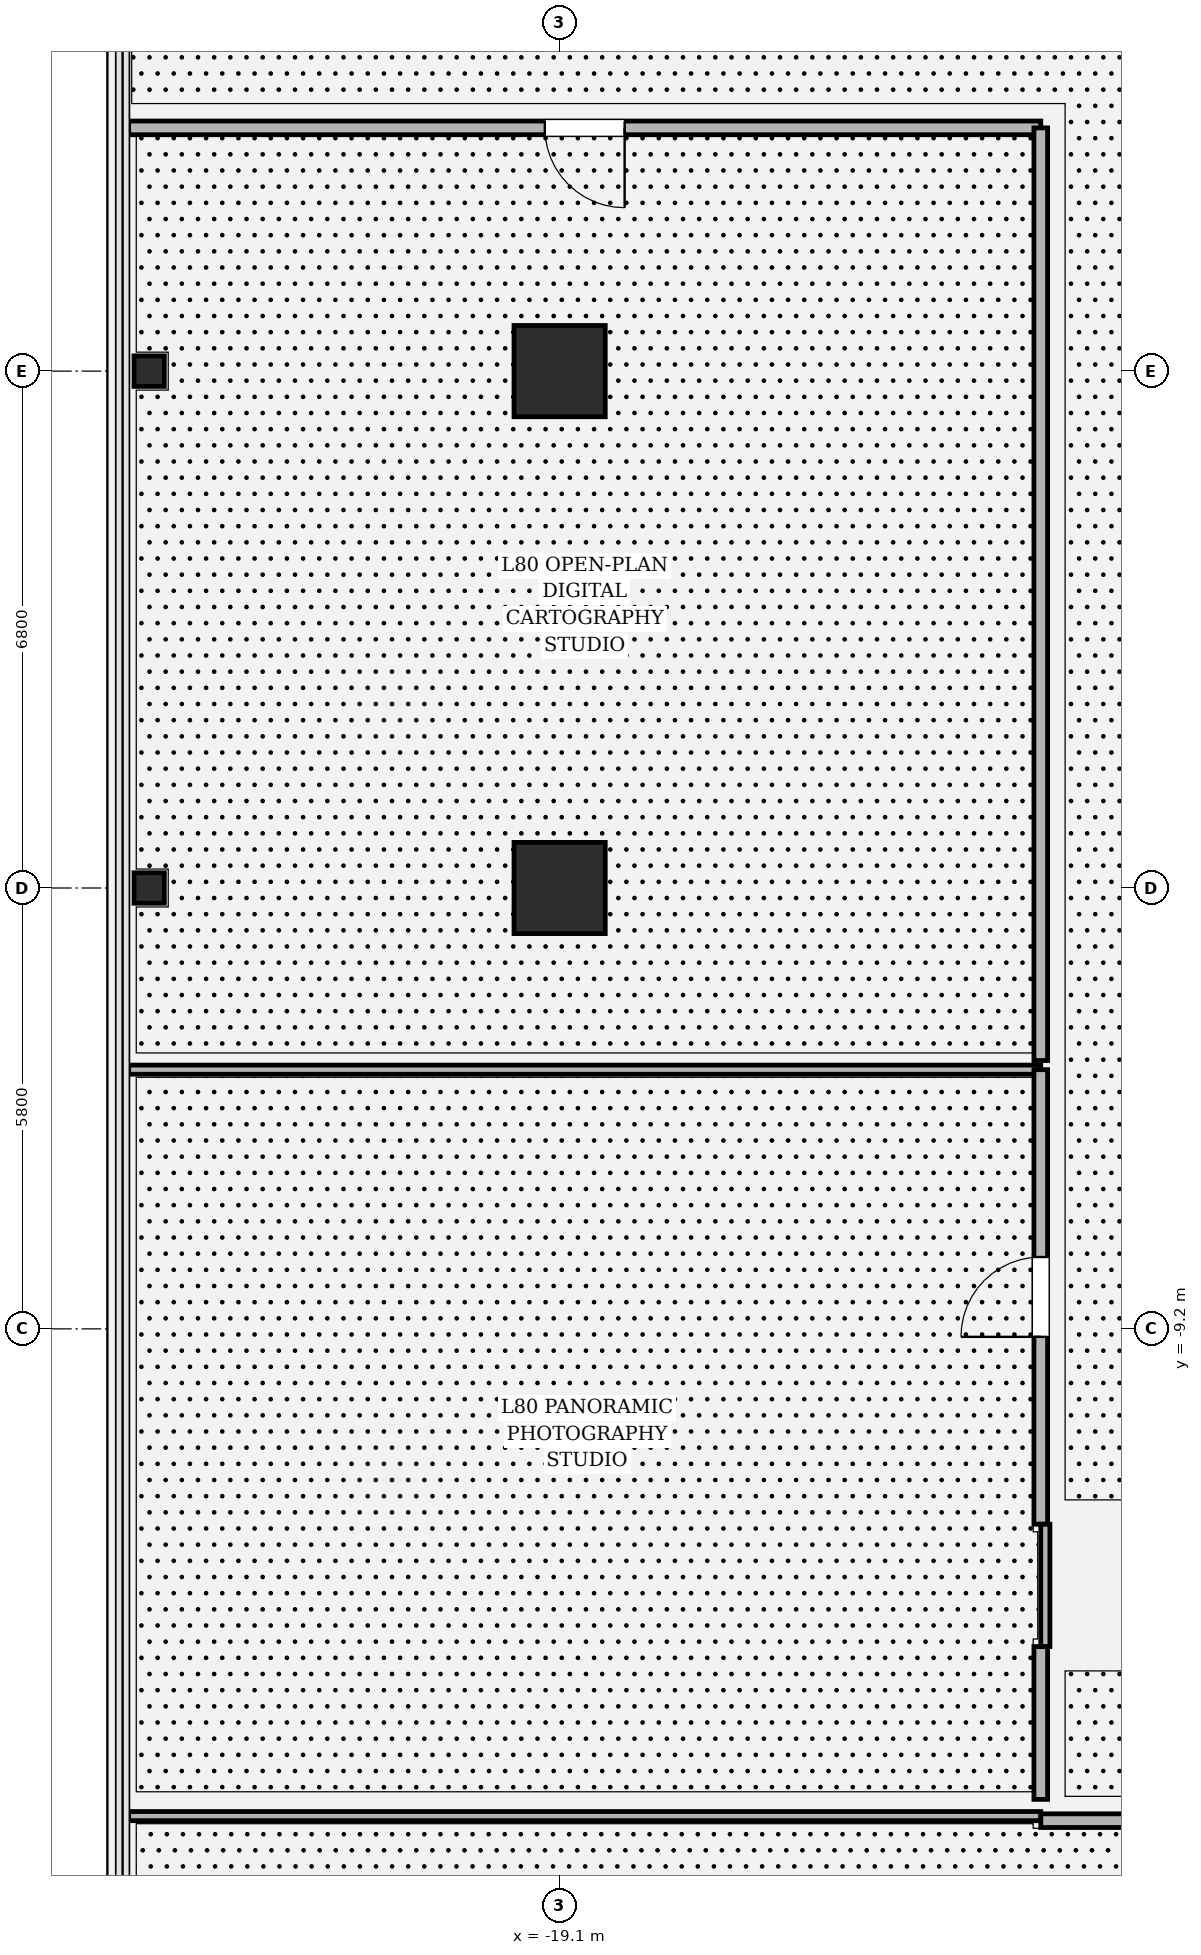
"""IFC4 building model, lengths in metres.
Left out: names, types, materials, properties, quantities, classifications, styles, units other than length and angle.
Written with IfcOpenShell. Run it as: python <this file> out.ifc"""

import sys

from ifc_helpers import new_model, si_unit, direction, frame, frame_2d, origin, origin_2d, place, context, subcontext, project, spatial, rectangle, hollow_rectangle, i_section, extrude, element, fill, save


model = new_model("IFC4")
c1 = context("Model", 3, precision=1e-05, world=origin(), true_north=direction((0.0, 1.0)))
c2 = subcontext(c1, "Body", "Model", "MODEL_VIEW")
j1 = project(units=[si_unit("LENGTHUNIT", "METRE"), si_unit("PLANEANGLEUNIT", "RADIAN")], contexts=[c1])
p1 = place(None, origin())
s1 = spatial("IfcSite", under=j1, at=p1, CompositionType="ELEMENT")
p2 = place(p1, origin())
s2 = spatial("IfcBuilding", under=s1, at=p2, CompositionType="ELEMENT")
p3 = place(p2, frame((0.0, 0.0, 339.0)))
s3 = spatial("IfcBuildingStorey", under=s2, at=p3, CompositionType="ELEMENT", Elevation=339.0)
for number, where, z_axis, x_axis in (
    (1, (-19.1, 3.4, 0.0), (0.0, 0.0, 1.0), (1.0, 0.0, 0.0)),
    (2, (-19.1, -3.4, 0.0), (0.0, 0.0, 1.0), (1.0, 0.0, 0.0)),
):
    element("IfcColumn", number, at=place(p3, frame(where, z_axis=z_axis, x_axis=x_axis)), inside=s3, PredefinedType="COLUMN", context=c2, shape_type="SweptSolid", body=[
        extrude(hollow_rectangle(XDim=1.2, YDim=1.2, WallThickness=0.035, at=origin_2d()), origin(), (0.0, 0.0, 1.0), 4.8),
    ])
for number, where, z_axis, x_axis in (
    (3, (-24.5, -3.4, 0.0), (0.0, 0.0, 1.0), (0.0, 1.0, 0.0)),
    (4, (-24.5, 3.4, 0.0), (0.0, 0.0, 1.0), (0.0, 1.0, 0.0)),
):
    element("IfcColumn", number, at=place(p3, frame(where, z_axis=z_axis, x_axis=x_axis)), inside=s3, PredefinedType="COLUMN", context=c2, shape_type="SweptSolid", body=[
        extrude(i_section(OverallWidth=0.401, OverallDepth=0.399, WebThickness=0.025, FlangeThickness=0.04, FilletRadius=0.018, at=origin_2d()), origin(), (0.0, 0.0, 1.0), 4.798),
    ])
p4 = place(p3, frame((-24.77, -15.61, 0.0), z_axis=(0.0, 0.0, 1.0), x_axis=(1.0, 0.0, 0.0)))
e5 = element("IfcWall", 5, at=p4, inside=s3, PredefinedType="PARTITIONING", context=c2, shape_type="SweptSolid", body=[
    extrude(rectangle(XDim=12.0, YDim=0.12, at=frame_2d((6.0, 0.0))), origin(), (0.0, 0.0, 1.0), 3.194),
])
p5 = place(p3, frame((-12.77, -15.67, 0.0), z_axis=(0.0, 0.0, 1.0), x_axis=(1.0, 0.0, 0.0)))
e6 = element("IfcWall", 6, at=p5, inside=s3, PredefinedType="PARTITIONING", context=c2, shape_type="SweptSolid", body=[
    extrude(rectangle(XDim=10.31, YDim=0.18, at=frame_2d((5.155, 0.0))), origin(), (0.0, 0.0, 1.0), 3.194),
])
p6 = place(p5, frame((4.405, 0.0, 0.0)))
e7 = element("IfcOpeningElement", 7, at=p6, cuts=e6, PredefinedType="OPENING", context=c2, shape_type="SweptSolid", body=[
    extrude(rectangle(XDim=1.5, YDim=2.3, at=frame_2d((0.75, 1.15))), frame((0.0, 0.1, 0.0), z_axis=(0.0, -1.0, 0.0), x_axis=(1.0, 0.0, 0.0)), (0.0, 0.0, 1.0), 0.2),
])
p7 = place(p3, frame((-24.77, -5.79, 0.0), z_axis=(0.0, 0.0, 1.0), x_axis=(1.0, 0.0, 0.0)))
e8 = element("IfcWall", 8, at=p7, inside=s3, PredefinedType="PARTITIONING", context=c2, shape_type="SweptSolid", body=[
    extrude(rectangle(XDim=12.0, YDim=0.12, at=frame_2d((6.0, 0.0))), origin(), (0.0, 0.0, 1.0), 3.194),
])
p8 = place(p3, frame((-12.77, -5.79, 0.0), z_axis=(0.0, 0.0, 1.0), x_axis=(0.0, -1.0, 0.0)))
e9 = element("IfcWall", 9, at=p8, inside=s3, PredefinedType="PARTITIONING", context=c2, shape_type="SweptSolid", body=[
    extrude(rectangle(XDim=5.98, YDim=0.18, at=frame_2d((2.99, 0.0))), origin(), (0.0, 0.0, 1.0), 3.194),
])
p9 = place(p8, frame((2.465, 0.0, 0.0)))
e10 = element("IfcOpeningElement", 10, at=p9, cuts=e9, PredefinedType="OPENING", context=c2, shape_type="SweptSolid", body=[
    extrude(rectangle(XDim=1.05, YDim=2.2, at=frame_2d((0.525, 1.1))), frame((0.0, 0.1, 0.0), z_axis=(0.0, -1.0, 0.0), x_axis=(1.0, 0.0, 0.0)), (0.0, 0.0, 1.0), 0.2),
])
p10 = place(p3, frame((-12.71, -11.77, 0.0), z_axis=(0.0, 0.0, 1.0), x_axis=(0.0, -1.0, 0.0)))
e11 = element("IfcWall", 11, at=p10, inside=s3, PredefinedType="PARTITIONING", context=c2, shape_type="SweptSolid", body=[
    extrude(rectangle(XDim=1.61, YDim=0.12, at=frame_2d((0.805, 0.0))), origin(), (0.0, 0.0, 1.0), 4.52),
])
p11 = place(p3, frame((-12.77, -13.38, 0.0), z_axis=(0.0, 0.0, 1.0), x_axis=(0.0, -1.0, 0.0)))
e12 = element("IfcWall", 12, at=p11, inside=s3, PredefinedType="PARTITIONING", context=c2, shape_type="SweptSolid", body=[
    extrude(rectangle(XDim=2.01, YDim=0.18, at=frame_2d((1.005, 0.0))), origin(), (0.0, 0.0, 1.0), 4.52),
])
p12 = place(p3, frame((-24.77, 6.6, 0.0), z_axis=(0.0, 0.0, 1.0), x_axis=(1.0, 0.0, 0.0)))
e13 = element("IfcWall", 13, at=p12, inside=s3, PredefinedType="PARTITIONING", context=c2, shape_type="SweptSolid", body=[
    extrude(rectangle(XDim=12.0, YDim=0.18, at=frame_2d((6.0, 0.0))), origin(), (0.0, 0.0, 1.0), 3.194),
])
p13 = place(p12, frame((5.475, 0.0, 0.0)))
e14 = element("IfcOpeningElement", 14, at=p13, cuts=e13, PredefinedType="OPENING", context=c2, shape_type="SweptSolid", body=[
    extrude(rectangle(XDim=1.05, YDim=2.2, at=frame_2d((0.525, 1.1))), frame((0.0, 0.1, 0.0), z_axis=(0.0, -1.0, 0.0), x_axis=(1.0, 0.0, 0.0)), (0.0, 0.0, 1.0), 0.2),
])
p14 = place(p3, frame((-12.77, 6.6, 0.0), z_axis=(0.0, 0.0, 1.0), x_axis=(0.0, -1.0, 0.0)))
e15 = element("IfcWall", 15, at=p14, inside=s3, PredefinedType="PARTITIONING", context=c2, shape_type="SweptSolid", body=[
    extrude(rectangle(XDim=12.27, YDim=0.18, at=frame_2d((6.135, 0.0))), origin(), (0.0, 0.0, 1.0), 3.194),
])
p15 = place(p9, origin())
e16 = element("IfcDoor", 16, at=p15, inside=s3, OperationType="SINGLE_SWING_RIGHT", PredefinedType="DOOR", context=c2, shape_type="SweptSolid", body=[
    extrude(rectangle(XDim=1.05, YDim=2.2, at=frame_2d((0.525, 1.1))), frame((0.0, 0.025, 0.0), z_axis=(0.0, -1.0, 0.0), x_axis=(1.0, 0.0, 0.0)), (0.0, 0.0, 1.0), 0.05),
])
fill(e10, e16)
p16 = place(p13, origin())
e17 = element("IfcDoor", 17, at=p16, inside=s3, OperationType="SINGLE_SWING_RIGHT", PredefinedType="DOOR", context=c2, shape_type="SweptSolid", body=[
    extrude(rectangle(XDim=1.05, YDim=2.2, at=frame_2d((0.525, 1.1))), frame((0.0, 0.025, 0.0), z_axis=(0.0, -1.0, 0.0), x_axis=(1.0, 0.0, 0.0)), (0.0, 0.0, 1.0), 0.05),
])
fill(e14, e17)
save(model, sys.argv[1])
